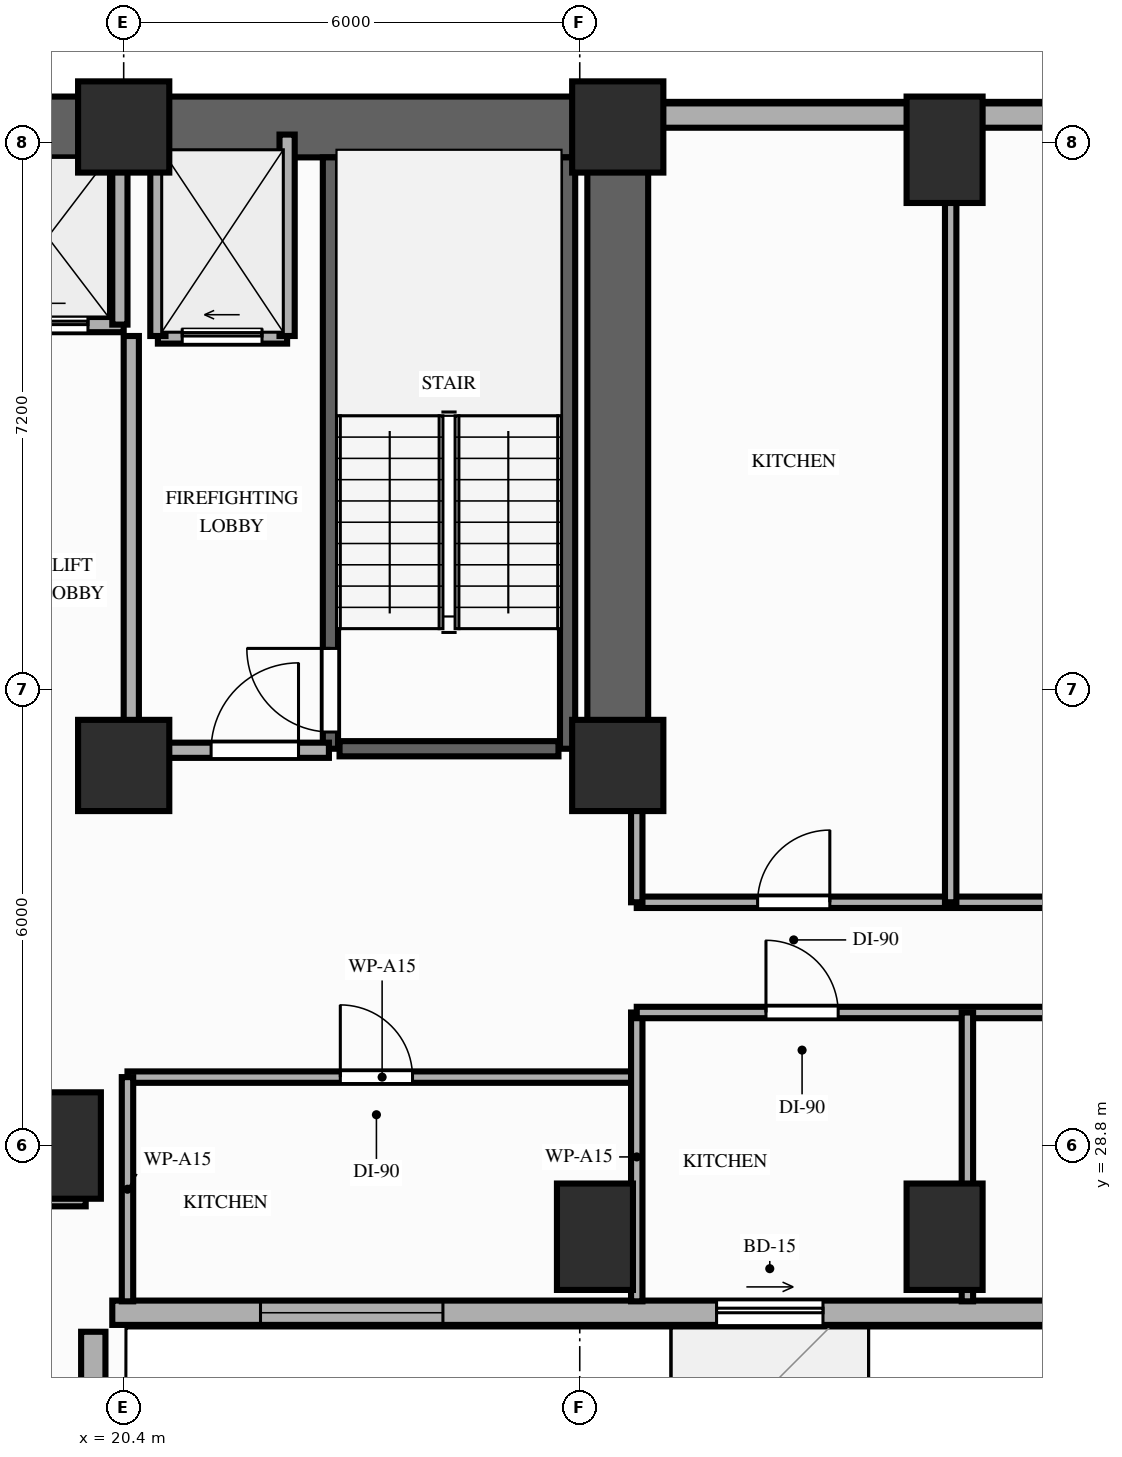
"""IFC4 building model, lengths in metres.
Left out: names, types, materials, properties, quantities, classifications, styles, units other than length and angle.
Written with IfcOpenShell. Run it as: python <this file> out.ifc"""

import sys

from ifc_helpers import new_model, si_unit, direction, frame, frame_2d, origin, origin_2d, place, context, subcontext, project, spatial, rectangle, extrude, element, fill, save


model = new_model("IFC4")
c1 = context("Model", 3, precision=1e-05, world=origin(), true_north=direction((0.0, 1.0)))
c2 = subcontext(c1, "Body", "Model", "MODEL_VIEW")
j1 = project(units=[si_unit("LENGTHUNIT", "METRE"), si_unit("PLANEANGLEUNIT", "RADIAN")], contexts=[c1])
p1 = place(None, origin())
s1 = spatial("IfcSite", under=j1, at=p1, CompositionType="ELEMENT")
p2 = place(p1, origin())
s2 = spatial("IfcBuilding", under=s1, at=p2, CompositionType="ELEMENT")
p3 = place(p2, frame((0.0, 0.0, 39.8)))
s3 = spatial("IfcBuildingStorey", under=s2, at=p3, CompositionType="ELEMENT", Elevation=39.8)
for number, where, z_axis, x_axis in (
    (1, (20.4, 33.8, 0.0), (0.0, 0.0, 1.0), (1.0, 0.0, 0.0)),
    (2, (26.9, 33.8, 0.0), (0.0, 0.0, 1.0), (1.0, 0.0, 0.0)),
    (3, (20.4, 42.2, 0.0), (0.0, 0.0, 1.0), (1.0, 0.0, 0.0)),
    (4, (26.9, 42.2, 0.0), (0.0, 0.0, 1.0), (1.0, 0.0, 0.0)),
):
    element("IfcColumn", number, at=place(p3, frame(where, z_axis=z_axis, x_axis=x_axis)), inside=s3, PredefinedType="COLUMN", context=c2, shape_type="SweptSolid", body=[
        extrude(rectangle(XDim=1.2, YDim=1.2, at=origin_2d()), origin(), (0.0, 0.0, 1.0), 3.8),
    ])
for number, where, z_axis, x_axis in (
    (5, (19.6, 28.8, 0.0), (0.0, 0.0, 1.0), (1.0, 0.0, 0.0)),
    (6, (26.6, 27.6, 0.0), (0.0, 0.0, 1.0), (1.0, 0.0, 0.0)),
):
    element("IfcColumn", number, at=place(p3, frame(where, z_axis=z_axis, x_axis=x_axis)), inside=s3, PredefinedType="COLUMN", context=c2, shape_type="SweptSolid", body=[
        extrude(rectangle(XDim=1.0, YDim=1.4, at=origin_2d()), origin(), (0.0, 0.0, 1.0), 3.8),
    ])
for number, where, z_axis, x_axis in (
    (7, (31.2, 27.6, -0.4), (0.0, 0.0, 1.0), (1.0, 0.0, 0.0)),
    (8, (31.2, 41.9, -0.4), (0.0, 0.0, 1.0), (1.0, 0.0, 0.0)),
):
    element("IfcColumn", number, at=place(p3, frame(where, z_axis=z_axis, x_axis=x_axis)), inside=s3, PredefinedType="COLUMN", context=c2, shape_type="SweptSolid", body=[
        extrude(rectangle(XDim=1.0, YDim=1.4, at=origin_2d()), origin(), (0.0, 0.0, 1.0), 4.2),
    ])
p4 = place(p3, frame((20.0, 8.8, 0.0), z_axis=(0.0, 0.0, 1.0), x_axis=(0.0, 1.0, 0.0)))
e9 = element("IfcWall", 9, at=p4, inside=s3, PredefinedType="STANDARD", context=c2, shape_type="SweptSolid", body=[
    extrude(rectangle(XDim=17.55, YDim=0.32, at=frame_2d((8.775, 0.0))), origin(), (0.0, 0.0, 1.0), 3.0),
])
p5 = place(p4, frame((5.88, 0.0, 0.85)))
e10 = element("IfcOpeningElement", 10, at=p5, cuts=e9, PredefinedType="OPENING", context=c2, shape_type="SweptSolid", body=[
    extrude(rectangle(XDim=1.5, YDim=1.75, at=frame_2d((0.75, 0.875))), frame((0.0, 0.17, 0.0), z_axis=(0.0, -1.0, 0.0), x_axis=(1.0, 0.0, 0.0)), (0.0, 0.0, 1.0), 0.34),
])
p6 = place(p4, frame((10.7, 0.0, 0.85)))
e11 = element("IfcOpeningElement", 11, at=p6, cuts=e9, PredefinedType="OPENING", context=c2, shape_type="SweptSolid", body=[
    extrude(rectangle(XDim=2.4, YDim=1.8, at=frame_2d((1.2, 0.9))), frame((0.0, 0.17, 0.0), z_axis=(0.0, -1.0, 0.0), x_axis=(1.0, 0.0, 0.0)), (0.0, 0.0, 1.0), 0.34),
])
p7 = place(p3, frame((46.4, 42.35, 0.0), z_axis=(0.0, 0.0, 1.0), x_axis=(-1.0, 0.0, 0.0)))
e12 = element("IfcWall", 12, at=p7, inside=s3, PredefinedType="STANDARD", context=c2, shape_type="SweptSolid", body=[
    extrude(rectangle(XDim=19.05, YDim=0.32, at=frame_2d((9.525, 0.0))), origin(), (0.0, 0.0, 1.0), 3.0),
])
p8 = place(p3, frame((20.25, 26.6, 0.0), z_axis=(0.0, 0.0, 1.0), x_axis=(1.0, 0.0, 0.0)))
e13 = element("IfcWall", 13, at=p8, inside=s3, PredefinedType="STANDARD", context=c2, shape_type="SweptSolid", body=[
    extrude(rectangle(XDim=26.15, YDim=0.32, at=frame_2d((13.075, 0.0))), origin(), (0.0, 0.0, 1.0), 3.62),
])
p9 = place(p8, frame((7.95, 0.0, 0.0)))
e14 = element("IfcOpeningElement", 14, at=p9, cuts=e13, PredefinedType="OPENING", context=c2, shape_type="SweptSolid", body=[
    extrude(rectangle(XDim=1.4, YDim=2.1, at=frame_2d((0.7, 1.05))), frame((0.0, 0.17, 0.0), z_axis=(0.0, -1.0, 0.0), x_axis=(1.0, 0.0, 0.0)), (0.0, 0.0, 1.0), 0.34),
])
p10 = place(p8, frame((22.45, 0.0, 0.0)))
e15 = element("IfcOpeningElement", 15, at=p10, cuts=e13, PredefinedType="OPENING", context=c2, shape_type="SweptSolid", body=[
    extrude(rectangle(XDim=1.4, YDim=2.1, at=frame_2d((0.7, 1.05))), frame((0.0, 0.17, 0.0), z_axis=(0.0, -1.0, 0.0), x_axis=(1.0, 0.0, 0.0)), (0.0, 0.0, 1.0), 0.34),
])
p11 = place(p8, frame((1.95, 0.0, 0.85)))
e16 = element("IfcOpeningElement", 16, at=p11, cuts=e13, PredefinedType="OPENING", context=c2, shape_type="SweptSolid", body=[
    extrude(rectangle(XDim=2.4, YDim=1.8, at=frame_2d((1.2, 0.9))), frame((0.0, 0.17, 0.0), z_axis=(0.0, -1.0, 0.0), x_axis=(1.0, 0.0, 0.0)), (0.0, 0.0, 1.0), 0.34),
])
p12 = place(p3, frame((6.45, 42.2, 0.0), z_axis=(0.0, 0.0, 1.0), x_axis=(1.0, 0.0, 0.0)))
e17 = element("IfcWall", 17, at=p12, inside=s3, PredefinedType="SHEAR", context=c2, shape_type="SweptSolid", body=[
    extrude(rectangle(XDim=20.45, YDim=0.8, at=frame_2d((10.225, 0.0))), origin(), (0.0, 0.0, 1.0), 3.62),
])
p13 = place(p3, frame((26.9, 33.8, 0.0), z_axis=(0.0, 0.0, 1.0), x_axis=(0.0, 1.0, 0.0)))
e18 = element("IfcWall", 18, at=p13, inside=s3, PredefinedType="SHEAR", context=c2, shape_type="SweptSolid", body=[
    extrude(rectangle(XDim=7.95, YDim=0.8, at=frame_2d((3.975, 0.0))), origin(), (0.0, 0.0, 1.0), 3.62),
])
p14 = place(p3, frame((23.12, 34.02, 0.0), z_axis=(0.0, 0.0, 1.0), x_axis=(0.0, 1.0, 0.0)))
e19 = element("IfcWall", 19, at=p14, inside=s3, PredefinedType="SHEAR", context=c2, shape_type="SweptSolid", body=[
    extrude(rectangle(XDim=7.78, YDim=0.2, at=frame_2d((3.89, 0.0))), origin(), (0.0, 0.0, 1.0), 3.62),
])
p15 = place(p14, frame((0.22, 0.0, 0.0)))
e20 = element("IfcOpeningElement", 20, at=p15, cuts=e19, PredefinedType="OPENING", context=c2, shape_type="SweptSolid", body=[
    extrude(rectangle(XDim=1.1, YDim=2.15, at=frame_2d((0.55, 1.075))), frame((0.0, 0.11, 0.0), z_axis=(0.0, -1.0, 0.0), x_axis=(1.0, 0.0, 0.0)), (0.0, 0.0, 1.0), 0.22),
])
p16 = place(p3, frame((26.24, 34.02, 0.0), z_axis=(0.0, 0.0, 1.0), x_axis=(0.0, 1.0, 0.0)))
e21 = element("IfcWall", 21, at=p16, inside=s3, PredefinedType="SHEAR", context=c2, shape_type="SweptSolid", body=[
    extrude(rectangle(XDim=7.78, YDim=0.2, at=frame_2d((3.89, 0.0))), origin(), (0.0, 0.0, 1.0), 3.62),
])
p17 = place(p3, frame((23.24, 34.02, 0.0), z_axis=(0.0, 0.0, 1.0), x_axis=(1.0, 0.0, 0.0)))
e22 = element("IfcWall", 22, at=p17, inside=s3, PredefinedType="SHEAR", context=c2, shape_type="SweptSolid", body=[
    extrude(rectangle(XDim=2.88, YDim=0.2, at=frame_2d((1.44, 0.0))), origin(), (0.0, 0.0, 1.0), 3.62),
])
p18 = place(p3, frame((20.85, 39.45, 0.0), z_axis=(0.0, 0.0, 1.0), x_axis=(1.0, 0.0, 0.0)))
e23 = element("IfcWall", 23, at=p18, inside=s3, PredefinedType="MOVABLE", context=c2, shape_type="SweptSolid", body=[
    extrude(rectangle(XDim=1.7, YDim=0.2, at=frame_2d((0.85, 0.0))), origin(), (0.0, 0.0, 1.0), 3.62),
])
p19 = place(p18, frame((0.32, 0.0, 0.0)))
e24 = element("IfcOpeningElement", 24, at=p19, cuts=e23, PredefinedType="OPENING", context=c2, shape_type="SweptSolid", body=[
    extrude(rectangle(XDim=1.05, YDim=2.15, at=frame_2d((0.525, 1.075))), frame((0.0, 0.11, 0.0), z_axis=(0.0, -1.0, 0.0), x_axis=(1.0, 0.0, 0.0)), (0.0, 0.0, 1.0), 0.22),
])
for number, where, z_axis, x_axis in (
    (25, (20.85, 39.45, 0.0), (0.0, 0.0, 1.0), (0.0, 1.0, 0.0)),
    (26, (22.55, 39.45, 0.0), (0.0, 0.0, 1.0), (0.0, 1.0, 0.0)),
):
    element("IfcWall", number, at=place(p3, frame(where, z_axis=z_axis, x_axis=x_axis)), inside=s3, PredefinedType="MOVABLE", context=c2, shape_type="SweptSolid", body=[
        extrude(rectangle(XDim=2.65, YDim=0.2, at=frame_2d((1.325, 0.0))), origin(), (0.0, 0.0, 1.0), 3.0),
    ])
p20 = place(p3, frame((20.5, 34.0, 0.0), z_axis=(0.0, 0.0, 1.0), x_axis=(0.0, 1.0, 0.0)))
e27 = element("IfcWall", 27, at=p20, inside=s3, PredefinedType="PARTITIONING", context=c2, shape_type="SweptSolid", body=[
    extrude(rectangle(XDim=5.45, YDim=0.2, at=frame_2d((2.725, 0.0))), origin(), (0.0, 0.0, 1.0), 3.0),
])
p21 = place(p3, frame((20.5, 34.0, 0.0), z_axis=(0.0, 0.0, 1.0), x_axis=(1.0, 0.0, 0.0)))
e28 = element("IfcWall", 28, at=p21, inside=s3, PredefinedType="PARTITIONING", context=c2, shape_type="SweptSolid", body=[
    extrude(rectangle(XDim=2.6, YDim=0.2, at=frame_2d((1.3, 0.0))), origin(), (0.0, 0.0, 1.0), 3.0),
])
p22 = place(p21, frame((1.05, 0.0, 0.0)))
e29 = element("IfcOpeningElement", 29, at=p22, cuts=e28, PredefinedType="OPENING", context=c2, shape_type="SweptSolid", body=[
    extrude(rectangle(XDim=1.15, YDim=2.15, at=frame_2d((0.575, 1.075))), frame((0.0, 0.11, 0.0), z_axis=(0.0, -1.0, 0.0), x_axis=(1.0, 0.0, 0.0)), (0.0, 0.0, 1.0), 0.22),
])
p23 = place(p3, frame((13.0, 39.6, 0.0), z_axis=(0.0, 0.0, 1.0), x_axis=(1.0, 0.0, 0.0)))
e30 = element("IfcWall", 30, at=p23, inside=s3, PredefinedType="MOVABLE", context=c2, shape_type="SweptSolid", body=[
    extrude(rectangle(XDim=7.4, YDim=0.2, at=frame_2d((3.7, 0.0))), origin(), (0.0, 0.0, 1.0), 3.62),
])
p24 = place(p23, frame((0.47, 0.0, 0.0)))
e31 = element("IfcOpeningElement", 31, at=p24, cuts=e30, PredefinedType="OPENING", context=c2, shape_type="SweptSolid", body=[
    extrude(rectangle(XDim=1.05, YDim=2.15, at=frame_2d((0.525, 1.075))), frame((0.0, 0.11, 0.0), z_axis=(0.0, -1.0, 0.0), x_axis=(1.0, 0.0, 0.0)), (0.0, 0.0, 1.0), 0.22),
])
p25 = place(p23, frame((2.28, 0.0, 0.0)))
e32 = element("IfcOpeningElement", 32, at=p25, cuts=e30, PredefinedType="OPENING", context=c2, shape_type="SweptSolid", body=[
    extrude(rectangle(XDim=1.05, YDim=2.15, at=frame_2d((0.525, 1.075))), frame((0.0, 0.11, 0.0), z_axis=(0.0, -1.0, 0.0), x_axis=(1.0, 0.0, 0.0)), (0.0, 0.0, 1.0), 0.22),
])
p26 = place(p23, frame((4.08, 0.0, 0.0)))
e33 = element("IfcOpeningElement", 33, at=p26, cuts=e30, PredefinedType="OPENING", context=c2, shape_type="SweptSolid", body=[
    extrude(rectangle(XDim=1.05, YDim=2.15, at=frame_2d((0.525, 1.075))), frame((0.0, 0.11, 0.0), z_axis=(0.0, -1.0, 0.0), x_axis=(1.0, 0.0, 0.0)), (0.0, 0.0, 1.0), 0.22),
])
p27 = place(p23, frame((5.88, 0.0, 0.0)))
e34 = element("IfcOpeningElement", 34, at=p27, cuts=e30, PredefinedType="OPENING", context=c2, shape_type="SweptSolid", body=[
    extrude(rectangle(XDim=1.05, YDim=2.15, at=frame_2d((0.525, 1.075))), frame((0.0, 0.11, 0.0), z_axis=(0.0, -1.0, 0.0), x_axis=(1.0, 0.0, 0.0)), (0.0, 0.0, 1.0), 0.22),
])
p28 = place(p3, frame((20.35, 39.6, 0.0), z_axis=(0.0, 0.0, 1.0), x_axis=(0.0, 1.0, 0.0)))
e35 = element("IfcWall", 35, at=p28, inside=s3, PredefinedType="MOVABLE", context=c2, shape_type="SweptSolid", body=[
    extrude(rectangle(XDim=2.18, YDim=0.2, at=frame_2d((1.09, 0.0))), origin(), (0.0, 0.0, 1.0), 3.62),
])
p29 = place(p3, frame((12.91, 28.1, 0.0), z_axis=(0.0, 0.0, 1.0), x_axis=(1.0, 0.0, 0.0)))
e36 = element("IfcWall", 36, at=p29, inside=s3, PredefinedType="PARTITIONING", context=c2, shape_type="SweptSolid", body=[
    extrude(rectangle(XDim=6.99, YDim=0.2, at=frame_2d((3.495, 0.0))), origin(), (0.0, 0.0, 1.0), 3.0),
])
p30 = place(p3, frame((20.45, 29.7, 0.0), z_axis=(0.0, 0.0, 1.0), x_axis=(1.0, 0.0, 0.0)))
e37 = element("IfcWall", 37, at=p30, inside=s3, PredefinedType="PARTITIONING", context=c2, shape_type="SweptSolid", body=[
    extrude(rectangle(XDim=6.7, YDim=0.15, at=frame_2d((3.35, 0.0))), origin(), (0.0, 0.0, 1.0), 3.62),
])
p31 = place(p30, frame((2.8, 0.0, 0.0)))
e38 = element("IfcOpeningElement", 38, at=p31, cuts=e37, PredefinedType="OPENING", context=c2, shape_type="SweptSolid", body=[
    extrude(rectangle(XDim=0.95, YDim=2.15, at=frame_2d((0.475, 1.075))), frame((0.0, 0.085, 0.0), z_axis=(0.0, -1.0, 0.0), x_axis=(1.0, 0.0, 0.0)), (0.0, 0.0, 1.0), 0.17),
])
p32 = place(p3, frame((20.45, 26.75, 0.0), z_axis=(0.0, 0.0, 1.0), x_axis=(0.0, 1.0, 0.0)))
e39 = element("IfcWall", 39, at=p32, inside=s3, PredefinedType="PARTITIONING", context=c2, shape_type="SweptSolid", body=[
    extrude(rectangle(XDim=2.95, YDim=0.15, at=frame_2d((1.475, 0.0))), origin(), (0.0, 0.0, 1.0), 3.0),
])
p33 = place(p3, frame((27.15, 26.75, 0.0), z_axis=(0.0, 0.0, 1.0), x_axis=(0.0, 1.0, 0.0)))
e40 = element("IfcWall", 40, at=p33, inside=s3, PredefinedType="PARTITIONING", context=c2, shape_type="SweptSolid", body=[
    extrude(rectangle(XDim=3.8, YDim=0.15, at=frame_2d((1.9, 0.0))), origin(), (0.0, 0.0, 1.0), 3.0),
])
p34 = place(p3, frame((27.15, 30.55, 0.0), z_axis=(0.0, 0.0, 1.0), x_axis=(1.0, 0.0, 0.0)))
e41 = element("IfcWall", 41, at=p34, inside=s3, PredefinedType="PARTITIONING", context=c2, shape_type="SweptSolid", body=[
    extrude(rectangle(XDim=11.15, YDim=0.15, at=frame_2d((5.575, 0.0))), origin(), (0.0, 0.0, 1.0), 3.0),
])
p35 = place(p34, frame((1.7, 0.0, 0.0)))
e42 = element("IfcOpeningElement", 42, at=p35, cuts=e41, PredefinedType="OPENING", context=c2, shape_type="SweptSolid", body=[
    extrude(rectangle(XDim=0.95, YDim=2.15, at=frame_2d((0.475, 1.075))), frame((0.0, 0.085, 0.0), z_axis=(0.0, -1.0, 0.0), x_axis=(1.0, 0.0, 0.0)), (0.0, 0.0, 1.0), 0.17),
])
p36 = place(p34, frame((5.43, 0.0, 0.0)))
e43 = element("IfcOpeningElement", 43, at=p36, cuts=e41, PredefinedType="OPENING", context=c2, shape_type="SweptSolid", body=[
    extrude(rectangle(XDim=0.95, YDim=2.15, at=frame_2d((0.475, 1.075))), frame((0.0, 0.085, 0.0), z_axis=(0.0, -1.0, 0.0), x_axis=(1.0, 0.0, 0.0)), (0.0, 0.0, 1.0), 0.17),
])
p37 = place(p34, frame((8.83, 0.0, 0.0)))
e44 = element("IfcOpeningElement", 44, at=p37, cuts=e41, PredefinedType="OPENING", context=c2, shape_type="SweptSolid", body=[
    extrude(rectangle(XDim=0.95, YDim=2.15, at=frame_2d((0.475, 1.075))), frame((0.0, 0.085, 0.0), z_axis=(0.0, -1.0, 0.0), x_axis=(1.0, 0.0, 0.0)), (0.0, 0.0, 1.0), 0.17),
])
p38 = place(p3, frame((27.15, 32.0, 0.0), z_axis=(0.0, 0.0, 1.0), x_axis=(1.0, 0.0, 0.0)))
e45 = element("IfcWall", 45, at=p38, inside=s3, PredefinedType="PARTITIONING", context=c2, shape_type="SweptSolid", body=[
    extrude(rectangle(XDim=11.15, YDim=0.15, at=frame_2d((5.575, 0.0))), origin(), (0.0, 0.0, 1.0), 3.0),
])
p39 = place(p38, frame((1.59, 0.0, 0.0)))
e46 = element("IfcOpeningElement", 46, at=p39, cuts=e45, PredefinedType="OPENING", context=c2, shape_type="SweptSolid", body=[
    extrude(rectangle(XDim=0.95, YDim=2.15, at=frame_2d((0.475, 1.075))), frame((0.0, 0.085, 0.0), z_axis=(0.0, -1.0, 0.0), x_axis=(1.0, 0.0, 0.0)), (0.0, 0.0, 1.0), 0.17),
])
p40 = place(p38, frame((7.16, 0.0, 0.0)))
e47 = element("IfcOpeningElement", 47, at=p40, cuts=e45, PredefinedType="OPENING", context=c2, shape_type="SweptSolid", body=[
    extrude(rectangle(XDim=0.95, YDim=2.15, at=frame_2d((0.475, 1.075))), frame((0.0, 0.085, 0.0), z_axis=(0.0, -1.0, 0.0), x_axis=(1.0, 0.0, 0.0)), (0.0, 0.0, 1.0), 0.17),
])
p41 = place(p3, frame((27.15, 32.0, 0.0), z_axis=(0.0, 0.0, 1.0), x_axis=(0.0, 1.0, 0.0)))
e48 = element("IfcWall", 48, at=p41, inside=s3, PredefinedType="PARTITIONING", context=c2, shape_type="SweptSolid", body=[
    extrude(rectangle(XDim=1.68, YDim=0.15, at=frame_2d((0.84, 0.0))), origin(), (0.0, 0.0, 1.0), 3.0),
])
p42 = place(p3, frame((31.5, 26.75, 0.0), z_axis=(0.0, 0.0, 1.0), x_axis=(0.0, 1.0, 0.0)))
e49 = element("IfcWall", 49, at=p42, inside=s3, PredefinedType="PARTITIONING", context=c2, shape_type="SweptSolid", body=[
    extrude(rectangle(XDim=3.8, YDim=0.15, at=frame_2d((1.9, 0.0))), origin(), (0.0, 0.0, 1.0), 3.0),
])
p43 = place(p3, frame((31.28, 32.0, 0.0), z_axis=(0.0, 0.0, 1.0), x_axis=(0.0, 1.0, 0.0)))
e50 = element("IfcWall", 50, at=p43, inside=s3, PredefinedType="PARTITIONING", context=c2, shape_type="SweptSolid", body=[
    extrude(rectangle(XDim=10.2, YDim=0.15, at=frame_2d((5.1, 0.0))), origin(), (0.0, 0.0, 1.0), 3.0),
])
p44 = place(p9, origin())
e51 = element("IfcDoor", 51, at=p44, inside=s3, OperationType="SLIDING_TO_RIGHT", PredefinedType="DOOR", context=c2, shape_type="SweptSolid", body=[
    extrude(rectangle(XDim=1.4, YDim=2.1, at=frame_2d((0.7, 1.05))), frame((0.0, 0.025, 0.0), z_axis=(0.0, -1.0, 0.0), x_axis=(1.0, 0.0, 0.0)), (0.0, 0.0, 1.0), 0.05),
])
fill(e14, e51)
p45 = place(p11, origin())
e52 = element("IfcWindow", 52, at=p45, inside=s3, PartitioningType="SINGLE_PANEL", PredefinedType="WINDOW", context=c2, shape_type="SweptSolid", body=[
    extrude(rectangle(XDim=2.4, YDim=1.8, at=frame_2d((1.2, 0.9))), frame((0.0, 0.03, 0.0), z_axis=(0.0, -1.0, 0.0), x_axis=(1.0, 0.0, 0.0)), (0.0, 0.0, 1.0), 0.06),
])
fill(e16, e52)
p46 = place(p15, origin())
e53 = element("IfcDoor", 53, at=p46, inside=s3, OperationType="SINGLE_SWING_RIGHT", PredefinedType="DOOR", context=c2, shape_type="SweptSolid", body=[
    extrude(rectangle(XDim=1.1, YDim=2.15, at=frame_2d((0.55, 1.075))), frame((0.0, 0.025, 0.0), z_axis=(0.0, -1.0, 0.0), x_axis=(1.0, 0.0, 0.0)), (0.0, 0.0, 1.0), 0.05),
])
fill(e20, e53)
p47 = place(p19, origin())
e54 = element("IfcDoor", 54, at=p47, inside=s3, OperationType="SLIDING_TO_LEFT", PredefinedType="DOOR", context=c2, shape_type="SweptSolid", body=[
    extrude(rectangle(XDim=1.05, YDim=2.15, at=frame_2d((0.525, 1.075))), frame((0.0, 0.025, 0.0), z_axis=(0.0, -1.0, 0.0), x_axis=(1.0, 0.0, 0.0)), (0.0, 0.0, 1.0), 0.05),
])
fill(e24, e54)
p48 = place(p22, origin())
e55 = element("IfcDoor", 55, at=p48, inside=s3, OperationType="SINGLE_SWING_RIGHT", PredefinedType="DOOR", context=c2, shape_type="SweptSolid", body=[
    extrude(rectangle(XDim=1.15, YDim=2.15, at=frame_2d((0.575, 1.075))), frame((0.0, 0.025, 0.0), z_axis=(0.0, -1.0, 0.0), x_axis=(1.0, 0.0, 0.0)), (0.0, 0.0, 1.0), 0.05),
])
fill(e29, e55)
p49 = place(p27, origin())
e56 = element("IfcDoor", 56, at=p49, inside=s3, OperationType="SLIDING_TO_LEFT", PredefinedType="DOOR", context=c2, shape_type="SweptSolid", body=[
    extrude(rectangle(XDim=1.05, YDim=2.15, at=frame_2d((0.525, 1.075))), frame((0.0, 0.025, 0.0), z_axis=(0.0, -1.0, 0.0), x_axis=(1.0, 0.0, 0.0)), (0.0, 0.0, 1.0), 0.05),
])
fill(e34, e56)
p50 = place(p31, origin())
e57 = element("IfcDoor", 57, at=p50, inside=s3, OperationType="SINGLE_SWING_LEFT", PredefinedType="DOOR", context=c2, shape_type="SweptSolid", body=[
    extrude(rectangle(XDim=0.95, YDim=2.15, at=frame_2d((0.475, 1.075))), frame((0.0, 0.025, 0.0), z_axis=(0.0, -1.0, 0.0), x_axis=(1.0, 0.0, 0.0)), (0.0, 0.0, 1.0), 0.05),
])
fill(e38, e57)
p51 = place(p35, origin())
e58 = element("IfcDoor", 58, at=p51, inside=s3, OperationType="SINGLE_SWING_LEFT", PredefinedType="DOOR", context=c2, shape_type="SweptSolid", body=[
    extrude(rectangle(XDim=0.95, YDim=2.15, at=frame_2d((0.475, 1.075))), frame((0.0, 0.025, 0.0), z_axis=(0.0, -1.0, 0.0), x_axis=(1.0, 0.0, 0.0)), (0.0, 0.0, 1.0), 0.05),
])
fill(e42, e58)
p52 = place(p39, origin())
e59 = element("IfcDoor", 59, at=p52, inside=s3, OperationType="SINGLE_SWING_RIGHT", PredefinedType="DOOR", context=c2, shape_type="SweptSolid", body=[
    extrude(rectangle(XDim=0.95, YDim=2.15, at=frame_2d((0.475, 1.075))), frame((0.0, 0.025, 0.0), z_axis=(0.0, -1.0, 0.0), x_axis=(1.0, 0.0, 0.0)), (0.0, 0.0, 1.0), 0.05),
])
fill(e46, e59)
save(model, sys.argv[1])
